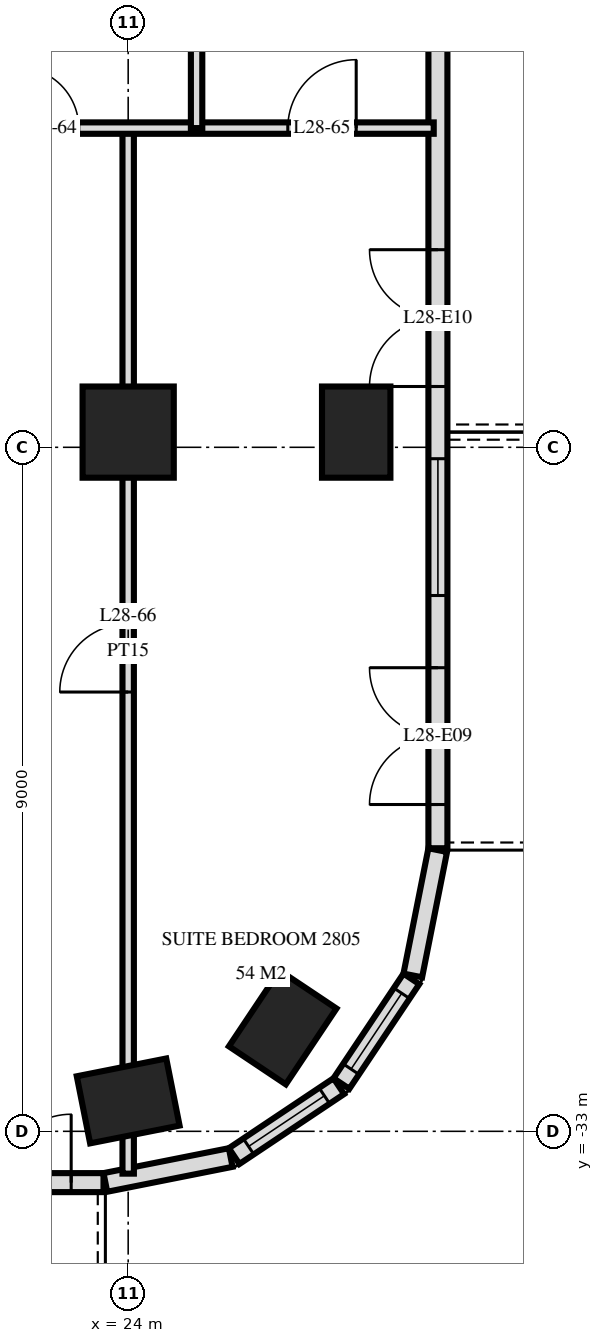
"""IFC4 building model, lengths in metres.
Left out: names, types, materials, properties, quantities, classifications, styles, units other than length and angle.
Written with IfcOpenShell. Run it as: python <this file> out.ifc"""

import sys

from ifc_helpers import new_model, si_unit, direction, frame, frame_2d, origin, origin_2d, place, context, subcontext, project, spatial, rectangle, extrude, element, fill, save


model = new_model("IFC4")
c1 = context("Model", 3, precision=1e-05, world=origin(), true_north=direction((0.0, 1.0)))
c2 = subcontext(c1, "Body", "Model", "MODEL_VIEW")
j1 = project(units=[si_unit("LENGTHUNIT", "METRE"), si_unit("PLANEANGLEUNIT", "RADIAN")], contexts=[c1])
p1 = place(None, origin())
s1 = spatial("IfcSite", under=j1, at=p1, CompositionType="ELEMENT")
p2 = place(p1, origin())
s2 = spatial("IfcBuilding", under=s1, at=p2, CompositionType="ELEMENT")
p3 = place(p2, frame((0.0, 0.0, 112.8)))
s3 = spatial("IfcBuildingStorey", under=s2, at=p3, CompositionType="ELEMENT", Elevation=112.8)
p4 = place(p3, frame((24.0, -32.6, -0.28), z_axis=(0.0, 0.0, 1.0), x_axis=(0.980792089743, 0.195056086032, 0.0)))
e1 = element("IfcColumn", 1, at=p4, inside=s3, PredefinedType="COLUMN", context=c2, shape_type="SweptSolid", body=[
    extrude(rectangle(XDim=1.2, YDim=0.9, at=origin_2d()), origin(), (0.0, 0.0, 1.0), 3.88),
])
p5 = place(p3, frame((24.0, -23.8, -0.28), z_axis=(0.0, 0.0, 1.0), x_axis=(1.0, 0.0, 0.0)))
e2 = element("IfcColumn", 2, at=p5, inside=s3, PredefinedType="COLUMN", context=c2, shape_type="SweptSolid", body=[
    extrude(rectangle(XDim=1.2, YDim=1.2, at=origin_2d()), origin(), (0.0, 0.0, 1.0), 3.88),
])
for number, where, z_axis, x_axis in (
    (3, (26.033, -31.633, -0.28), (0.0, 0.0, 1.0), (0.556, 0.831, 0.0)),
    (4, (27.0, -23.8, -0.28), (0.0, 0.0, 1.0), (0.0, 1.0, 0.0)),
):
    element("IfcColumn", number, at=place(p3, frame(where, z_axis=z_axis, x_axis=x_axis)), inside=s3, PredefinedType="COLUMN", context=c2, shape_type="SweptSolid", body=[
        extrude(rectangle(XDim=1.2, YDim=0.9, at=origin_2d()), origin(), (0.0, 0.0, 1.0), 3.88),
    ])
p6 = place(p3, frame((-23.675, -33.675, 0.0), z_axis=(0.0, 0.0, 1.0), x_axis=(1.0, 0.0, 0.0)))
e5 = element("IfcWall", 5, at=p6, inside=s3, PredefinedType="SOLIDWALL", context=c2, shape_type="SweptSolid", body=[
    extrude(rectangle(XDim=47.351, YDim=0.25, at=frame_2d((23.675, 0.0))), origin(), (0.0, 0.0, 1.0), 3.32),
])
p7 = place(p6, frame((0.275, 0.0, 0.3)))
e6 = element("IfcOpeningElement", 6, at=p7, cuts=e5, PredefinedType="OPENING", context=c2, shape_type="SweptSolid", body=[
    extrude(rectangle(XDim=2.4, YDim=2.1, at=frame_2d((1.2, 1.05))), frame((0.0, 0.135, 0.0), z_axis=(0.0, -1.0, 0.0), x_axis=(1.0, 0.0, 0.0)), (0.0, 0.0, 1.0), 0.27),
])
p8 = place(p6, frame((3.425, 0.0, 0.0)))
e7 = element("IfcOpeningElement", 7, at=p8, cuts=e5, PredefinedType="OPENING", context=c2, shape_type="SweptSolid", body=[
    extrude(rectangle(XDim=1.8, YDim=2.4, at=frame_2d((0.9, 1.2))), frame((0.0, 0.135, 0.0), z_axis=(0.0, -1.0, 0.0), x_axis=(1.0, 0.0, 0.0)), (0.0, 0.0, 1.0), 0.27),
])
p9 = place(p6, frame((5.975, 0.0, 0.3)))
e8 = element("IfcOpeningElement", 8, at=p9, cuts=e5, PredefinedType="OPENING", context=c2, shape_type="SweptSolid", body=[
    extrude(rectangle(XDim=2.4, YDim=2.1, at=frame_2d((1.2, 1.05))), frame((0.0, 0.135, 0.0), z_axis=(0.0, -1.0, 0.0), x_axis=(1.0, 0.0, 0.0)), (0.0, 0.0, 1.0), 0.27),
])
p10 = place(p6, frame((9.275, 0.0, 0.0)))
e9 = element("IfcOpeningElement", 9, at=p10, cuts=e5, PredefinedType="OPENING", context=c2, shape_type="SweptSolid", body=[
    extrude(rectangle(XDim=1.8, YDim=2.4, at=frame_2d((0.9, 1.2))), frame((0.0, 0.135, 0.0), z_axis=(0.0, -1.0, 0.0), x_axis=(1.0, 0.0, 0.0)), (0.0, 0.0, 1.0), 0.27),
])
p11 = place(p6, frame((12.275, 0.0, 0.0)))
e10 = element("IfcOpeningElement", 10, at=p11, cuts=e5, PredefinedType="OPENING", context=c2, shape_type="SweptSolid", body=[
    extrude(rectangle(XDim=1.8, YDim=2.4, at=frame_2d((0.9, 1.2))), frame((0.0, 0.135, 0.0), z_axis=(0.0, -1.0, 0.0), x_axis=(1.0, 0.0, 0.0)), (0.0, 0.0, 1.0), 0.27),
])
p12 = place(p6, frame((14.975, 0.0, 0.3)))
e11 = element("IfcOpeningElement", 11, at=p12, cuts=e5, PredefinedType="OPENING", context=c2, shape_type="SweptSolid", body=[
    extrude(rectangle(XDim=2.4, YDim=2.1, at=frame_2d((1.2, 1.05))), frame((0.0, 0.135, 0.0), z_axis=(0.0, -1.0, 0.0), x_axis=(1.0, 0.0, 0.0)), (0.0, 0.0, 1.0), 0.27),
])
p13 = place(p6, frame((17.975, 0.0, 0.3)))
e12 = element("IfcOpeningElement", 12, at=p13, cuts=e5, PredefinedType="OPENING", context=c2, shape_type="SweptSolid", body=[
    extrude(rectangle(XDim=2.4, YDim=2.1, at=frame_2d((1.2, 1.05))), frame((0.0, 0.135, 0.0), z_axis=(0.0, -1.0, 0.0), x_axis=(1.0, 0.0, 0.0)), (0.0, 0.0, 1.0), 0.27),
])
p14 = place(p6, frame((21.275, 0.0, 0.0)))
e13 = element("IfcOpeningElement", 13, at=p14, cuts=e5, PredefinedType="OPENING", context=c2, shape_type="SweptSolid", body=[
    extrude(rectangle(XDim=1.8, YDim=2.4, at=frame_2d((0.9, 1.2))), frame((0.0, 0.135, 0.0), z_axis=(0.0, -1.0, 0.0), x_axis=(1.0, 0.0, 0.0)), (0.0, 0.0, 1.0), 0.27),
])
p15 = place(p6, frame((24.275, 0.0, 0.0)))
e14 = element("IfcOpeningElement", 14, at=p15, cuts=e5, PredefinedType="OPENING", context=c2, shape_type="SweptSolid", body=[
    extrude(rectangle(XDim=1.8, YDim=2.4, at=frame_2d((0.9, 1.2))), frame((0.0, 0.135, 0.0), z_axis=(0.0, -1.0, 0.0), x_axis=(1.0, 0.0, 0.0)), (0.0, 0.0, 1.0), 0.27),
])
p16 = place(p6, frame((26.975, 0.0, 0.3)))
e15 = element("IfcOpeningElement", 15, at=p16, cuts=e5, PredefinedType="OPENING", context=c2, shape_type="SweptSolid", body=[
    extrude(rectangle(XDim=2.4, YDim=2.1, at=frame_2d((1.2, 1.05))), frame((0.0, 0.135, 0.0), z_axis=(0.0, -1.0, 0.0), x_axis=(1.0, 0.0, 0.0)), (0.0, 0.0, 1.0), 0.27),
])
p17 = place(p6, frame((30.275, 0.0, 0.0)))
e16 = element("IfcOpeningElement", 16, at=p17, cuts=e5, PredefinedType="OPENING", context=c2, shape_type="SweptSolid", body=[
    extrude(rectangle(XDim=1.8, YDim=2.4, at=frame_2d((0.9, 1.2))), frame((0.0, 0.135, 0.0), z_axis=(0.0, -1.0, 0.0), x_axis=(1.0, 0.0, 0.0)), (0.0, 0.0, 1.0), 0.27),
])
p18 = place(p6, frame((32.975, 0.0, 0.3)))
e17 = element("IfcOpeningElement", 17, at=p18, cuts=e5, PredefinedType="OPENING", context=c2, shape_type="SweptSolid", body=[
    extrude(rectangle(XDim=2.4, YDim=2.1, at=frame_2d((1.2, 1.05))), frame((0.0, 0.135, 0.0), z_axis=(0.0, -1.0, 0.0), x_axis=(1.0, 0.0, 0.0)), (0.0, 0.0, 1.0), 0.27),
])
p19 = place(p6, frame((35.975, 0.0, 0.3)))
e18 = element("IfcOpeningElement", 18, at=p19, cuts=e5, PredefinedType="OPENING", context=c2, shape_type="SweptSolid", body=[
    extrude(rectangle(XDim=2.4, YDim=2.1, at=frame_2d((1.2, 1.05))), frame((0.0, 0.135, 0.0), z_axis=(0.0, -1.0, 0.0), x_axis=(1.0, 0.0, 0.0)), (0.0, 0.0, 1.0), 0.27),
])
p20 = place(p6, frame((39.275, 0.0, 0.0)))
e19 = element("IfcOpeningElement", 19, at=p20, cuts=e5, PredefinedType="OPENING", context=c2, shape_type="SweptSolid", body=[
    extrude(rectangle(XDim=1.8, YDim=2.4, at=frame_2d((0.9, 1.2))), frame((0.0, 0.135, 0.0), z_axis=(0.0, -1.0, 0.0), x_axis=(1.0, 0.0, 0.0)), (0.0, 0.0, 1.0), 0.27),
])
p21 = place(p6, frame((41.975, 0.0, 0.3)))
e20 = element("IfcOpeningElement", 20, at=p21, cuts=e5, PredefinedType="OPENING", context=c2, shape_type="SweptSolid", body=[
    extrude(rectangle(XDim=2.4, YDim=2.1, at=frame_2d((1.2, 1.05))), frame((0.0, 0.135, 0.0), z_axis=(0.0, -1.0, 0.0), x_axis=(1.0, 0.0, 0.0)), (0.0, 0.0, 1.0), 0.27),
])
p22 = place(p6, frame((45.125, 0.0, 0.0)))
e21 = element("IfcOpeningElement", 21, at=p22, cuts=e5, PredefinedType="OPENING", context=c2, shape_type="SweptSolid", body=[
    extrude(rectangle(XDim=1.8, YDim=2.4, at=frame_2d((0.9, 1.2))), frame((0.0, 0.135, 0.0), z_axis=(0.0, -1.0, 0.0), x_axis=(1.0, 0.0, 0.0)), (0.0, 0.0, 1.0), 0.27),
])
p23 = place(p3, frame((23.7, -33.673, 0.0), z_axis=(0.0, 0.0, 1.0), x_axis=(0.980775640221, 0.19513878023, 0.0)))
e22 = element("IfcWall", 22, at=p23, inside=s3, PredefinedType="SOLIDWALL", context=c2, shape_type="SweptSolid", body=[
    extrude(rectangle(XDim=1.681, YDim=0.25, at=frame_2d((0.841, 0.0))), origin(), (0.0, 0.0, 1.0), 3.32),
])
p24 = place(p3, frame((25.394, -33.326, 0.0), z_axis=(0.0, 0.0, 1.0), x_axis=(0.831482937015, 0.55555029066, 0.0)))
e23 = element("IfcWall", 23, at=p24, inside=s3, PredefinedType="SOLIDWALL", context=c2, shape_type="SweptSolid", body=[
    extrude(rectangle(XDim=1.656, YDim=0.25, at=frame_2d((0.828, 0.0))), origin(), (0.0, 0.0, 1.0), 3.32),
])
p25 = place(p24, frame((0.228, 0.0, 0.9)))
e24 = element("IfcOpeningElement", 24, at=p25, cuts=e23, PredefinedType="OPENING", context=c2, shape_type="SweptSolid", body=[
    extrude(rectangle(XDim=1.2, YDim=1.5, at=frame_2d((0.6, 0.75))), frame((0.0, 0.135, 0.0), z_axis=(0.0, -1.0, 0.0), x_axis=(1.0, 0.0, 0.0)), (0.0, 0.0, 1.0), 0.27),
])
p26 = place(p3, frame((26.806, -32.371, 0.0), z_axis=(0.0, 0.0, 1.0), x_axis=(0.55555029066, 0.831482937015, 0.0)))
e25 = element("IfcWall", 25, at=p26, inside=s3, PredefinedType="SOLIDWALL", context=c2, shape_type="SweptSolid", body=[
    extrude(rectangle(XDim=1.656, YDim=0.25, at=frame_2d((0.828, 0.0))), origin(), (0.0, 0.0, 1.0), 3.32),
])
p27 = place(p26, frame((0.228, 0.0, 0.9)))
e26 = element("IfcOpeningElement", 26, at=p27, cuts=e25, PredefinedType="OPENING", context=c2, shape_type="SweptSolid", body=[
    extrude(rectangle(XDim=1.2, YDim=1.5, at=frame_2d((0.6, 0.75))), frame((0.0, 0.135, 0.0), z_axis=(0.0, -1.0, 0.0), x_axis=(1.0, 0.0, 0.0)), (0.0, 0.0, 1.0), 0.27),
])
p28 = place(p3, frame((27.745, -30.949, 0.0), z_axis=(0.0, 0.0, 1.0), x_axis=(0.194999110559, 0.980803419081, 0.0)))
e27 = element("IfcWall", 27, at=p28, inside=s3, PredefinedType="SOLIDWALL", context=c2, shape_type="SweptSolid", body=[
    extrude(rectangle(XDim=1.681, YDim=0.25, at=frame_2d((0.841, 0.0))), origin(), (0.0, 0.0, 1.0), 3.32),
])
p29 = place(p3, frame((28.075, -29.275, 0.0), z_axis=(0.0, 0.0, 1.0), x_axis=(0.0, 1.0, 0.0)))
e28 = element("IfcWall", 28, at=p29, inside=s3, PredefinedType="SOLIDWALL", context=c2, shape_type="SweptSolid", body=[
    extrude(rectangle(XDim=25.951, YDim=0.25, at=frame_2d((12.975, 0.0))), origin(), (0.0, 0.0, 1.0), 3.32),
])
p30 = place(p29, frame((0.575, 0.0, 0.0)))
e29 = element("IfcOpeningElement", 29, at=p30, cuts=e28, PredefinedType="OPENING", context=c2, shape_type="SweptSolid", body=[
    extrude(rectangle(XDim=1.8, YDim=2.4, at=frame_2d((0.9, 1.2))), frame((0.0, 0.135, 0.0), z_axis=(0.0, -1.0, 0.0), x_axis=(1.0, 0.0, 0.0)), (0.0, 0.0, 1.0), 0.27),
])
p31 = place(p29, frame((3.325, 0.0, 0.3)))
e30 = element("IfcOpeningElement", 30, at=p31, cuts=e28, PredefinedType="OPENING", context=c2, shape_type="SweptSolid", body=[
    extrude(rectangle(XDim=1.8, YDim=2.1, at=frame_2d((0.9, 1.05))), frame((0.0, 0.135, 0.0), z_axis=(0.0, -1.0, 0.0), x_axis=(1.0, 0.0, 0.0)), (0.0, 0.0, 1.0), 0.27),
])
p32 = place(p29, frame((6.075, 0.0, 0.0)))
e31 = element("IfcOpeningElement", 31, at=p32, cuts=e28, PredefinedType="OPENING", context=c2, shape_type="SweptSolid", body=[
    extrude(rectangle(XDim=1.8, YDim=2.4, at=frame_2d((0.9, 1.2))), frame((0.0, 0.135, 0.0), z_axis=(0.0, -1.0, 0.0), x_axis=(1.0, 0.0, 0.0)), (0.0, 0.0, 1.0), 0.27),
])
p33 = place(p29, frame((17.125, 0.0, 0.0)))
e32 = element("IfcOpeningElement", 32, at=p33, cuts=e28, PredefinedType="OPENING", context=c2, shape_type="SweptSolid", body=[
    extrude(rectangle(XDim=1.8, YDim=2.4, at=frame_2d((0.9, 1.2))), frame((0.0, 0.135, 0.0), z_axis=(0.0, -1.0, 0.0), x_axis=(1.0, 0.0, 0.0)), (0.0, 0.0, 1.0), 0.27),
])
p34 = place(p3, frame((24.9, -19.8, 0.0), z_axis=(0.0, 0.0, 1.0), x_axis=(0.0, 1.0, 0.0)))
e33 = element("IfcWall", 33, at=p34, inside=s3, PredefinedType="PARTITIONING", context=c2, shape_type="SweptSolid", body=[
    extrude(rectangle(XDim=3.0, YDim=0.15, at=frame_2d((1.5, 0.0))), origin(), (0.0, 0.0, 1.0), 3.32),
])
p35 = place(p3, frame((24.0, -33.557, 0.0), z_axis=(0.0, 0.0, 1.0), x_axis=(0.0, 1.0, 0.0)))
e34 = element("IfcWall", 34, at=p35, inside=s3, PredefinedType="PARTITIONING", context=c2, shape_type="SweptSolid", body=[
    extrude(rectangle(XDim=13.757, YDim=0.15, at=frame_2d((6.878, 0.0))), origin(), (0.0, 0.0, 1.0), 3.32),
])
p36 = place(p35, frame((6.337, 0.0, 0.0)))
e35 = element("IfcOpeningElement", 35, at=p36, cuts=e34, PredefinedType="OPENING", context=c2, shape_type="SweptSolid", body=[
    extrude(rectangle(XDim=0.9, YDim=2.1, at=frame_2d((0.45, 1.05))), frame((0.0, 0.085, 0.0), z_axis=(0.0, -1.0, 0.0), x_axis=(1.0, 0.0, 0.0)), (0.0, 0.0, 1.0), 0.17),
])
p37 = place(p3, frame((21.9, -19.8, 0.0), z_axis=(0.0, 0.0, 1.0), x_axis=(1.0, 0.0, 0.0)))
e36 = element("IfcWall", 36, at=p37, inside=s3, PredefinedType="PARTITIONING", context=c2, shape_type="SweptSolid", body=[
    extrude(rectangle(XDim=6.12, YDim=0.15, at=frame_2d((3.06, 0.0))), origin(), (0.0, 0.0, 1.0), 3.32),
])
p38 = place(p37, frame((0.65, 0.0, 0.0)))
e37 = element("IfcOpeningElement", 37, at=p38, cuts=e36, PredefinedType="OPENING", context=c2, shape_type="SweptSolid", body=[
    extrude(rectangle(XDim=0.8, YDim=2.1, at=frame_2d((0.4, 1.05))), frame((0.0, 0.085, 0.0), z_axis=(0.0, -1.0, 0.0), x_axis=(1.0, 0.0, 0.0)), (0.0, 0.0, 1.0), 0.17),
])
p39 = place(p37, frame((4.2, 0.0, 0.0)))
e38 = element("IfcOpeningElement", 38, at=p39, cuts=e36, PredefinedType="OPENING", context=c2, shape_type="SweptSolid", body=[
    extrude(rectangle(XDim=0.9, YDim=2.1, at=frame_2d((0.45, 1.05))), frame((0.0, 0.085, 0.0), z_axis=(0.0, -1.0, 0.0), x_axis=(1.0, 0.0, 0.0)), (0.0, 0.0, 1.0), 0.17),
])
p40 = place(p25, origin())
e39 = element("IfcWindow", 39, at=p40, inside=s3, PartitioningType="SINGLE_PANEL", PredefinedType="WINDOW", context=c2, shape_type="SweptSolid", body=[
    extrude(rectangle(XDim=1.2, YDim=1.5, at=frame_2d((0.6, 0.75))), frame((0.0, 0.03, 0.0), z_axis=(0.0, -1.0, 0.0), x_axis=(1.0, 0.0, 0.0)), (0.0, 0.0, 1.0), 0.06),
])
fill(e24, e39)
p41 = place(p27, origin())
e40 = element("IfcWindow", 40, at=p41, inside=s3, PartitioningType="SINGLE_PANEL", PredefinedType="WINDOW", context=c2, shape_type="SweptSolid", body=[
    extrude(rectangle(XDim=1.2, YDim=1.5, at=frame_2d((0.6, 0.75))), frame((0.0, 0.03, 0.0), z_axis=(0.0, -1.0, 0.0), x_axis=(1.0, 0.0, 0.0)), (0.0, 0.0, 1.0), 0.06),
])
fill(e26, e40)
p42 = place(p22, origin())
e41 = element("IfcDoor", 41, at=p42, inside=s3, OperationType="DOUBLE_DOOR_SINGLE_SWING", PredefinedType="DOOR", context=c2, shape_type="SweptSolid", body=[
    extrude(rectangle(XDim=1.8, YDim=2.4, at=frame_2d((0.9, 1.2))), frame((0.0, 0.025, 0.0), z_axis=(0.0, -1.0, 0.0), x_axis=(1.0, 0.0, 0.0)), (0.0, 0.0, 1.0), 0.05),
])
fill(e21, e41)
p43 = place(p30, origin())
e42 = element("IfcDoor", 42, at=p43, inside=s3, OperationType="DOUBLE_DOOR_SINGLE_SWING", PredefinedType="DOOR", context=c2, shape_type="SweptSolid", body=[
    extrude(rectangle(XDim=1.8, YDim=2.4, at=frame_2d((0.9, 1.2))), frame((0.0, 0.025, 0.0), z_axis=(0.0, -1.0, 0.0), x_axis=(1.0, 0.0, 0.0)), (0.0, 0.0, 1.0), 0.05),
])
fill(e29, e42)
p44 = place(p31, origin())
e43 = element("IfcWindow", 43, at=p44, inside=s3, PartitioningType="SINGLE_PANEL", PredefinedType="WINDOW", context=c2, shape_type="SweptSolid", body=[
    extrude(rectangle(XDim=1.8, YDim=2.1, at=frame_2d((0.9, 1.05))), frame((0.0, 0.03, 0.0), z_axis=(0.0, -1.0, 0.0), x_axis=(1.0, 0.0, 0.0)), (0.0, 0.0, 1.0), 0.06),
])
fill(e30, e43)
p45 = place(p32, origin())
e44 = element("IfcDoor", 44, at=p45, inside=s3, OperationType="DOUBLE_DOOR_SINGLE_SWING", PredefinedType="DOOR", context=c2, shape_type="SweptSolid", body=[
    extrude(rectangle(XDim=1.8, YDim=2.4, at=frame_2d((0.9, 1.2))), frame((0.0, 0.025, 0.0), z_axis=(0.0, -1.0, 0.0), x_axis=(1.0, 0.0, 0.0)), (0.0, 0.0, 1.0), 0.05),
])
fill(e31, e44)
p46 = place(p38, origin())
e45 = element("IfcDoor", 45, at=p46, inside=s3, OperationType="SINGLE_SWING_RIGHT", PredefinedType="DOOR", context=c2, shape_type="SweptSolid", body=[
    extrude(rectangle(XDim=0.8, YDim=2.1, at=frame_2d((0.4, 1.05))), frame((0.0, 0.025, 0.0), z_axis=(0.0, -1.0, 0.0), x_axis=(1.0, 0.0, 0.0)), (0.0, 0.0, 1.0), 0.05),
])
fill(e37, e45)
p47 = place(p39, origin())
e46 = element("IfcDoor", 46, at=p47, inside=s3, OperationType="SINGLE_SWING_LEFT", PredefinedType="DOOR", context=c2, shape_type="SweptSolid", body=[
    extrude(rectangle(XDim=0.9, YDim=2.1, at=frame_2d((0.45, 1.05))), frame((0.0, 0.025, 0.0), z_axis=(0.0, -1.0, 0.0), x_axis=(1.0, 0.0, 0.0)), (0.0, 0.0, 1.0), 0.05),
])
fill(e38, e46)
p48 = place(p36, origin())
e47 = element("IfcDoor", 47, at=p48, inside=s3, OperationType="SINGLE_SWING_RIGHT", PredefinedType="DOOR", context=c2, shape_type="SweptSolid", body=[
    extrude(rectangle(XDim=0.9, YDim=2.1, at=frame_2d((0.45, 1.05))), frame((0.0, 0.025, 0.0), z_axis=(0.0, -1.0, 0.0), x_axis=(1.0, 0.0, 0.0)), (0.0, 0.0, 1.0), 0.05),
])
fill(e35, e47)
save(model, sys.argv[1])
